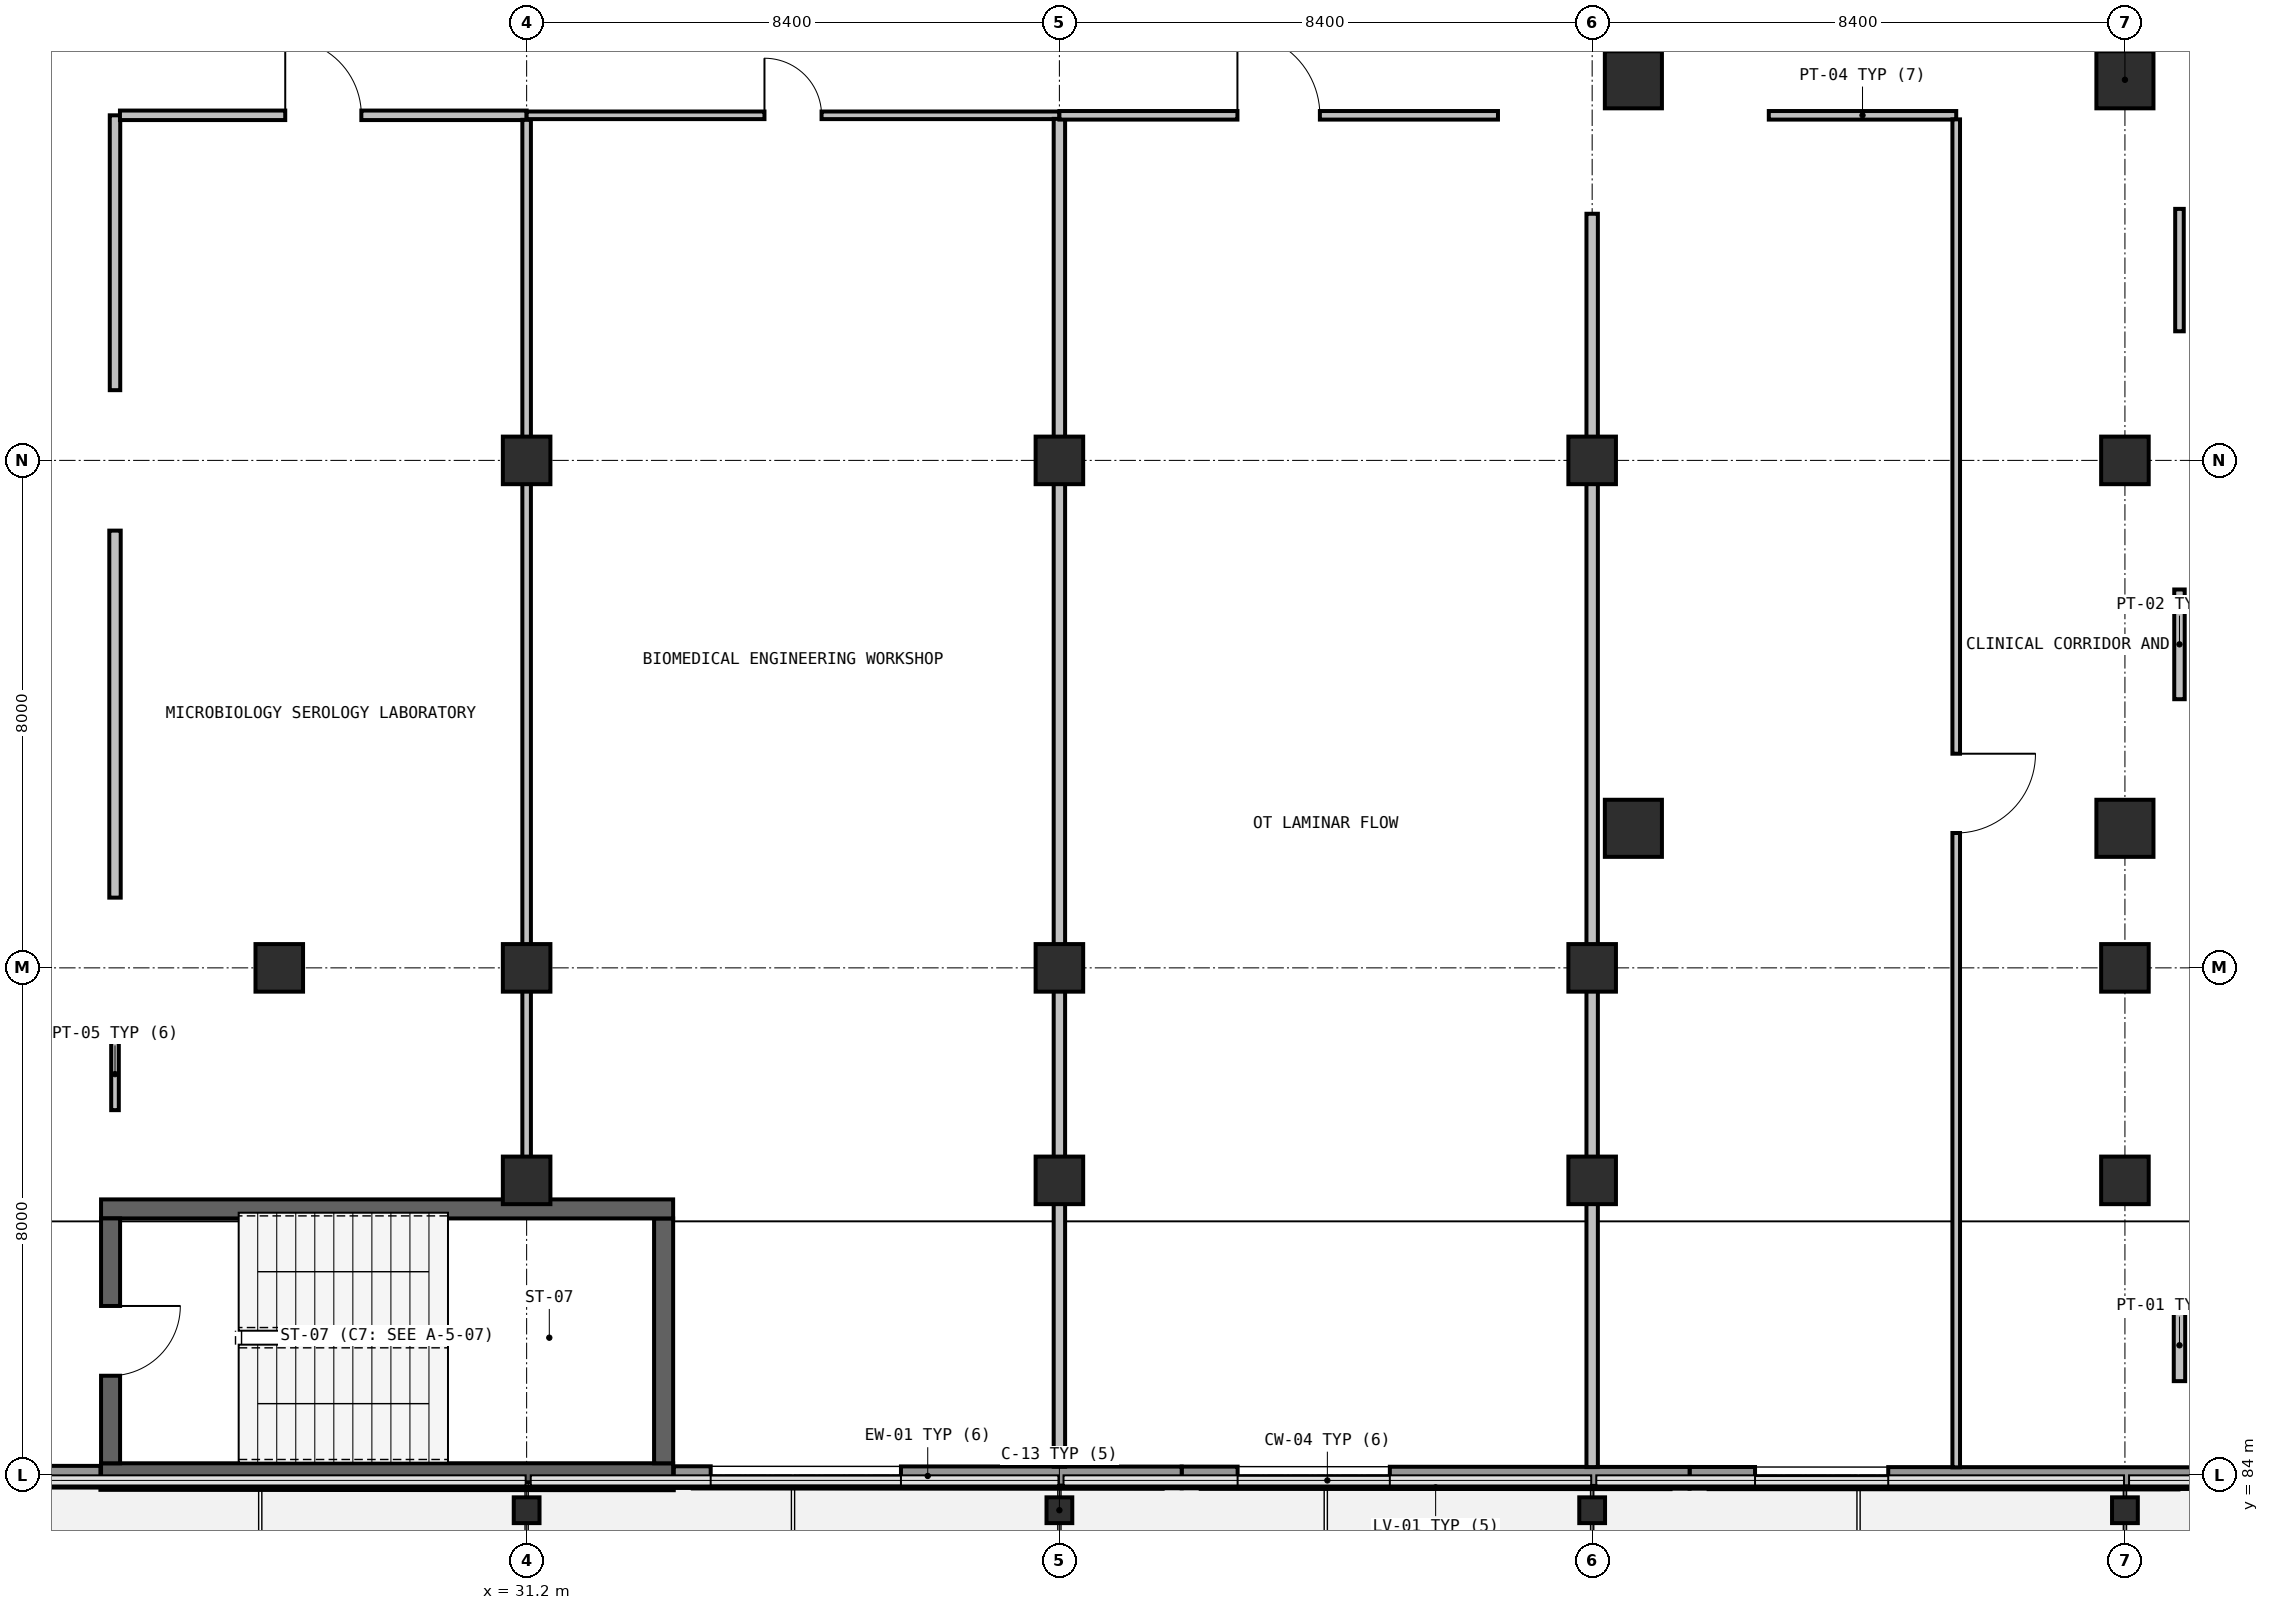
"""IFC4 building model, lengths in metres.
Left out: names, types, materials, properties, quantities, classifications, styles, units other than length and angle.
Written with IfcOpenShell. Run it as: python <this file> out.ifc"""

import sys

from ifc_helpers import new_model, si_unit, direction, frame, frame_2d, origin, origin_2d, place, context, subcontext, project, spatial, rectangle, hollow_circle, extrude, element, fill, save


model = new_model("IFC4")
c1 = context("Model", 3, precision=1e-05, world=origin(), true_north=direction((0.0, 1.0)))
c2 = subcontext(c1, "Body", "Model", "MODEL_VIEW")
j1 = project(units=[si_unit("LENGTHUNIT", "METRE"), si_unit("PLANEANGLEUNIT", "RADIAN")], contexts=[c1])
p1 = place(None, origin())
s1 = spatial("IfcSite", under=j1, at=p1, CompositionType="ELEMENT")
p2 = place(p1, origin())
s2 = spatial("IfcBuilding", under=s1, at=p2, CompositionType="ELEMENT")
p3 = place(p2, frame((0.0, 0.0, 15.0)))
s3 = spatial("IfcBuildingStorey", under=s2, at=p3, CompositionType="ELEMENT", Elevation=15.0)
for number, where, z_axis, x_axis in (
    (1, (31.2, 83.45, 0.0), (0.0, 0.0, 1.0), (1.0, 0.0, 0.0)),
    (2, (39.6, 83.45, 0.0), (0.0, 0.0, 1.0), (1.0, 0.0, 0.0)),
    (3, (48.0, 83.45, 0.0), (0.0, 0.0, 1.0), (1.0, 0.0, 0.0)),
    (4, (56.4, 83.45, 0.0), (0.0, 0.0, 1.0), (1.0, 0.0, 0.0)),
):
    element("IfcColumn", number, at=place(p3, frame(where, z_axis=z_axis, x_axis=x_axis)), inside=s3, PredefinedType="COLUMN", context=c2, shape_type="SweptSolid", body=[
        extrude(hollow_circle(Radius=0.203, WallThickness=0.016, at=origin_2d()), origin(), (0.0, 0.0, 1.0), 3.155),
    ])
for number, where, z_axis, x_axis in (
    (5, (48.65, 94.2, 0.0), (0.0, 0.0, 1.0), (1.0, 0.0, 0.0)),
    (6, (56.4, 94.2, 0.0), (0.0, 0.0, 1.0), (1.0, 0.0, 0.0)),
    (7, (48.65, 106.0, 0.0), (0.0, 0.0, 1.0), (1.0, 0.0, 0.0)),
    (8, (56.4, 106.0, 0.0), (0.0, 0.0, 1.0), (1.0, 0.0, 0.0)),
):
    element("IfcColumn", number, at=place(p3, frame(where, z_axis=z_axis, x_axis=x_axis)), inside=s3, PredefinedType="COLUMN", context=c2, shape_type="SweptSolid", body=[
        extrude(rectangle(XDim=0.9, YDim=0.9, at=origin_2d()), origin(), (0.0, 0.0, 1.0), 4.2),
    ])
for number, where, z_axis, x_axis in (
    (9, (27.3, 92.0, 0.0), (0.0, 0.0, 1.0), (1.0, 0.0, 0.0)),
    (10, (31.2, 88.65, 0.0), (0.0, 0.0, 1.0), (1.0, 0.0, 0.0)),
    (11, (31.2, 92.0, 0.0), (0.0, 0.0, 1.0), (1.0, 0.0, 0.0)),
    (12, (31.2, 100.0, 0.0), (0.0, 0.0, 1.0), (1.0, 0.0, 0.0)),
    (13, (39.6, 88.65, 0.0), (0.0, 0.0, 1.0), (1.0, 0.0, 0.0)),
    (14, (39.6, 92.0, 0.0), (0.0, 0.0, 1.0), (1.0, 0.0, 0.0)),
    (15, (39.6, 100.0, 0.0), (0.0, 0.0, 1.0), (1.0, 0.0, 0.0)),
    (16, (48.0, 88.65, 0.0), (0.0, 0.0, 1.0), (1.0, 0.0, 0.0)),
    (17, (48.0, 92.0, 0.0), (0.0, 0.0, 1.0), (1.0, 0.0, 0.0)),
    (18, (48.0, 100.0, 0.0), (0.0, 0.0, 1.0), (1.0, 0.0, 0.0)),
    (19, (56.4, 88.65, 0.0), (0.0, 0.0, 1.0), (1.0, 0.0, 0.0)),
    (20, (56.4, 92.0, 0.0), (0.0, 0.0, 1.0), (1.0, 0.0, 0.0)),
    (21, (56.4, 100.0, 0.0), (0.0, 0.0, 1.0), (1.0, 0.0, 0.0)),
):
    element("IfcColumn", number, at=place(p3, frame(where, z_axis=z_axis, x_axis=x_axis)), inside=s3, PredefinedType="COLUMN", context=c2, shape_type="SweptSolid", body=[
        extrude(rectangle(XDim=0.75, YDim=0.75, at=origin_2d()), origin(), (0.0, 0.0, 1.0), 4.2),
    ])
p4 = place(p3, frame((57.544, 83.977, 0.0), z_axis=(0.0, 0.0, 1.0), x_axis=(-0.99999981411, 0.000609737395, 0.0)))
e22 = element("IfcWall", 22, at=p4, inside=s3, PredefinedType="SOLIDWALL", context=c2, shape_type="SweptSolid", body=[
    extrude(rectangle(XDim=8.008, YDim=0.3, at=frame_2d((4.004, 0.0))), origin(), (0.0, 0.0, 1.0), 3.895),
])
p5 = place(p4, frame((4.876, 0.0, 0.96)))
e23 = element("IfcOpeningElement", 23, at=p5, cuts=e22, PredefinedType="OPENING", context=c2, shape_type="SweptSolid", body=[
    extrude(rectangle(XDim=2.1, YDim=1.65, at=frame_2d((1.05, 0.825))), frame((0.0, 0.16, 0.0), z_axis=(0.0, -1.0, 0.0), x_axis=(1.0, 0.0, 0.0)), (0.0, 0.0, 1.0), 0.32),
])
p6 = place(p3, frame((49.536, 83.982, 0.0), z_axis=(0.0, 0.0, 1.0), x_axis=(-0.999999709529, 0.000762194901, 0.0)))
e24 = element("IfcWall", 24, at=p6, inside=s3, PredefinedType="SOLIDWALL", context=c2, shape_type="SweptSolid", body=[
    extrude(rectangle(XDim=8.008, YDim=0.3, at=frame_2d((4.004, 0.0))), origin(), (0.0, 0.0, 1.0), 3.895),
])
p7 = place(p6, frame((4.726, 0.0, 0.96)))
e25 = element("IfcOpeningElement", 25, at=p7, cuts=e24, PredefinedType="OPENING", context=c2, shape_type="SweptSolid", body=[
    extrude(rectangle(XDim=2.4, YDim=1.65, at=frame_2d((1.2, 0.825))), frame((0.0, 0.16, 0.0), z_axis=(0.0, -1.0, 0.0), x_axis=(1.0, 0.0, 0.0)), (0.0, 0.0, 1.0), 0.32),
])
p8 = place(p3, frame((41.528, 83.988, 0.0), z_axis=(0.0, 0.0, 1.0), x_axis=(-0.99999981411, 0.000609737395, 0.0)))
e26 = element("IfcWall", 26, at=p8, inside=s3, PredefinedType="SOLIDWALL", context=c2, shape_type="SweptSolid", body=[
    extrude(rectangle(XDim=8.008, YDim=0.3, at=frame_2d((4.004, 0.0))), origin(), (0.0, 0.0, 1.0), 3.895),
])
p9 = place(p8, frame((4.426, 0.0, 0.96)))
e27 = element("IfcOpeningElement", 27, at=p9, cuts=e26, PredefinedType="OPENING", context=c2, shape_type="SweptSolid", body=[
    extrude(rectangle(XDim=3.0, YDim=1.65, at=frame_2d((1.5, 0.825))), frame((0.0, 0.16, 0.0), z_axis=(0.0, -1.0, 0.0), x_axis=(1.0, 0.0, 0.0)), (0.0, 0.0, 1.0), 0.32),
])
p10 = place(p3, frame((24.48, 83.999, 0.0), z_axis=(0.0, 0.0, 1.0), x_axis=(-0.999999830842, 0.000581648876, 0.0)))
e28 = element("IfcWall", 28, at=p10, inside=s3, PredefinedType="SOLIDWALL", context=c2, shape_type="SweptSolid", body=[
    extrude(rectangle(XDim=1.679, YDim=0.3, at=frame_2d((0.839, 0.0))), origin(), (0.0, 0.0, 1.0), 3.895),
])
p11 = place(p3, frame((24.49, 84.04, 0.0), z_axis=(0.0, 0.0, 1.0), x_axis=(1.0, 0.0, 0.0)))
e29 = element("IfcWall", 29, at=p11, inside=s3, PredefinedType="SHEAR", context=c2, shape_type="SweptSolid", body=[
    extrude(rectangle(XDim=9.02, YDim=0.3, at=frame_2d((4.51, 0.0))), origin(), (0.0, 0.0, 1.0), 3.895),
])
p12 = place(p3, frame((33.36, 84.19, 0.0), z_axis=(0.0, 0.0, 1.0), x_axis=(0.0, 1.0, 0.0)))
e30 = element("IfcWall", 30, at=p12, inside=s3, PredefinedType="SHEAR", context=c2, shape_type="SweptSolid", body=[
    extrude(rectangle(XDim=3.86, YDim=0.3, at=frame_2d((1.93, 0.0))), origin(), (0.0, 0.0, 1.0), 3.895),
])
p13 = place(p3, frame((33.51, 88.2, 0.0), z_axis=(0.0, 0.0, 1.0), x_axis=(-1.0, 0.0, 0.0)))
e31 = element("IfcWall", 31, at=p13, inside=s3, PredefinedType="SHEAR", context=c2, shape_type="SweptSolid", body=[
    extrude(rectangle(XDim=9.02, YDim=0.3, at=frame_2d((4.51, 0.0))), origin(), (0.0, 0.0, 1.0), 3.895),
])
p14 = place(p3, frame((24.64, 88.05, 0.0), z_axis=(0.0, 0.0, 1.0), x_axis=(0.0, -1.0, 0.0)))
e32 = element("IfcWall", 32, at=p14, inside=s3, PredefinedType="SHEAR", context=c2, shape_type="SweptSolid", body=[
    extrude(rectangle(XDim=3.86, YDim=0.3, at=frame_2d((1.93, 0.0))), origin(), (0.0, 0.0, 1.0), 3.895),
])
p15 = place(p14, frame((1.38, 0.0, 0.0)))
e33 = element("IfcOpeningElement", 33, at=p15, cuts=e32, PredefinedType="OPENING", context=c2, shape_type="SweptSolid", body=[
    extrude(rectangle(XDim=1.1, YDim=2.15, at=frame_2d((0.55, 1.075))), frame((0.0, 0.16, 0.0), z_axis=(0.0, -1.0, 0.0), x_axis=(1.0, 0.0, 0.0)), (0.0, 0.0, 1.0), 0.32),
])
p16 = place(p3, frame((24.71, 89.757, 0.0), z_axis=(0.0, 0.0, 1.0), x_axis=(0.0, 1.0, 0.0)))
e34 = element("IfcWall", 34, at=p16, inside=s3, PredefinedType="PARTITIONING", context=c2, shape_type="SweptSolid", body=[
    extrude(rectangle(XDim=1.136, YDim=0.12, at=frame_2d((0.568, 0.0))), origin(), (0.0, 0.0, 1.0), 3.895),
])
p17 = place(p3, frame((24.71, 93.107, 0.0), z_axis=(0.0, 0.0, 1.0), x_axis=(0.0, 1.0, 0.0)))
e35 = element("IfcWall", 35, at=p17, inside=s3, PredefinedType="PARTITIONING", context=c2, shape_type="SweptSolid", body=[
    extrude(rectangle(XDim=5.786, YDim=0.18, at=frame_2d((2.893, 0.0))), origin(), (0.0, 0.0, 1.0), 3.895),
])
p18 = place(p3, frame((24.71, 101.107, 0.0), z_axis=(0.0, 0.0, 1.0), x_axis=(0.0, 1.0, 0.0)))
e36 = element("IfcWall", 36, at=p18, inside=s3, PredefinedType="PARTITIONING", context=c2, shape_type="SweptSolid", body=[
    extrude(rectangle(XDim=4.333, YDim=0.165, at=frame_2d((2.167, 0.0))), origin(), (0.0, 0.0, 1.0), 3.895),
])
p19 = place(p3, frame((24.788, 105.44, 0.0), z_axis=(0.0, 0.0, 1.0), x_axis=(1.0, 0.0, 0.0)))
e37 = element("IfcWall", 37, at=p19, inside=s3, PredefinedType="PARTITIONING", context=c2, shape_type="SweptSolid", body=[
    extrude(rectangle(XDim=6.412, YDim=0.15, at=frame_2d((3.206, 0.0))), origin(), (0.0, 0.0, 1.0), 3.895),
])
p20 = place(p19, frame((2.606, 0.0, 0.0)))
e38 = element("IfcOpeningElement", 38, at=p20, cuts=e37, PredefinedType="OPENING", context=c2, shape_type="SweptSolid", body=[
    extrude(rectangle(XDim=1.2, YDim=2.15, at=frame_2d((0.6, 1.075))), frame((0.0, 0.085, 0.0), z_axis=(0.0, -1.0, 0.0), x_axis=(1.0, 0.0, 0.0)), (0.0, 0.0, 1.0), 0.17),
])
p21 = place(p3, frame((31.2, 105.369, 0.0), z_axis=(0.0, 0.0, 1.0), x_axis=(0.0, -1.0, 0.0)))
e39 = element("IfcWall", 39, at=p21, inside=s3, PredefinedType="PARTITIONING", context=c2, shape_type="SweptSolid", body=[
    extrude(rectangle(XDim=17.022, YDim=0.135, at=frame_2d((8.511, 0.0))), origin(), (0.0, 0.0, 1.0), 3.245),
])
p22 = place(p3, frame((31.2, 105.44, 0.0), z_axis=(0.0, 0.0, 1.0), x_axis=(1.0, 0.0, 0.0)))
e40 = element("IfcWall", 40, at=p22, inside=s3, PredefinedType="PARTITIONING", context=c2, shape_type="SweptSolid", body=[
    extrude(rectangle(XDim=8.4, YDim=0.12, at=frame_2d((4.2, 0.0))), origin(), (0.0, 0.0, 1.0), 3.895),
])
p23 = place(p22, frame((3.75, 0.0, 0.0)))
e41 = element("IfcOpeningElement", 41, at=p23, cuts=e40, PredefinedType="OPENING", context=c2, shape_type="SweptSolid", body=[
    extrude(rectangle(XDim=0.9, YDim=2.1, at=frame_2d((0.45, 1.05))), frame((0.0, 0.07, 0.0), z_axis=(0.0, -1.0, 0.0), x_axis=(1.0, 0.0, 0.0)), (0.0, 0.0, 1.0), 0.14),
])
p24 = place(p3, frame((39.6, 105.384, 0.0), z_axis=(0.0, 0.0, 1.0), x_axis=(0.0, -1.0, 0.0)))
e42 = element("IfcWall", 42, at=p24, inside=s3, PredefinedType="PARTITIONING", context=c2, shape_type="SweptSolid", body=[
    extrude(rectangle(XDim=21.248, YDim=0.18, at=frame_2d((10.624, 0.0))), origin(), (0.0, 0.0, 1.0), 3.245),
])
p25 = place(p3, frame((39.6, 105.44, 0.0), z_axis=(0.0, 0.0, 1.0), x_axis=(1.0, 0.0, 0.0)))
e43 = element("IfcWall", 43, at=p25, inside=s3, PredefinedType="PARTITIONING", context=c2, shape_type="SweptSolid", body=[
    extrude(rectangle(XDim=6.915, YDim=0.135, at=frame_2d((3.458, 0.0))), origin(), (0.0, 0.0, 1.0), 3.895),
])
p26 = place(p25, frame((2.807, 0.0, 0.0)))
e44 = element("IfcOpeningElement", 44, at=p26, cuts=e43, PredefinedType="OPENING", context=c2, shape_type="SweptSolid", body=[
    extrude(rectangle(XDim=1.3, YDim=2.15, at=frame_2d((0.65, 1.075))), frame((0.0, 0.077, 0.0), z_axis=(0.0, -1.0, 0.0), x_axis=(1.0, 0.0, 0.0)), (0.0, 0.0, 1.0), 0.155),
])
p27 = place(p3, frame((48.0, 103.888, 0.0), z_axis=(0.0, 0.0, 1.0), x_axis=(0.0, -1.0, 0.0)))
e45 = element("IfcWall", 45, at=p27, inside=s3, PredefinedType="PARTITIONING", context=c2, shape_type="SweptSolid", body=[
    extrude(rectangle(XDim=19.758, YDim=0.18, at=frame_2d((9.879, 0.0))), origin(), (0.0, 0.0, 1.0), 3.245),
])
p28 = place(p3, frame((50.785, 105.44, 0.0), z_axis=(0.0, 0.0, 1.0), x_axis=(1.0, 0.0, 0.0)))
e46 = element("IfcWall", 46, at=p28, inside=s3, PredefinedType="PARTITIONING", context=c2, shape_type="SweptSolid", body=[
    extrude(rectangle(XDim=2.955, YDim=0.135, at=frame_2d((1.478, 0.0))), origin(), (0.0, 0.0, 1.0), 3.895),
])
p29 = place(p3, frame((53.74, 105.376, 0.0), z_axis=(0.0, 0.0, 1.0), x_axis=(0.0, -1.0, 0.0)))
e47 = element("IfcWall", 47, at=p29, inside=s3, PredefinedType="PARTITIONING", context=c2, shape_type="SweptSolid", body=[
    extrude(rectangle(XDim=21.25, YDim=0.12, at=frame_2d((10.625, 0.0))), origin(), (0.0, 0.0, 1.0), 3.895),
])
p30 = place(p29, frame((10.0, 0.0, 0.0)))
e48 = element("IfcOpeningElement", 48, at=p30, cuts=e47, PredefinedType="OPENING", context=c2, shape_type="SweptSolid", body=[
    extrude(rectangle(XDim=1.25, YDim=2.15, at=frame_2d((0.625, 1.075))), frame((0.0, 0.07, 0.0), z_axis=(0.0, -1.0, 0.0), x_axis=(1.0, 0.0, 0.0)), (0.0, 0.0, 1.0), 0.14),
])
p31 = place(p3, frame((57.26, 85.485, 0.0), z_axis=(0.0, 0.0, 1.0), x_axis=(0.0, 1.0, 0.0)))
e49 = element("IfcWall", 49, at=p31, inside=s3, PredefinedType="PARTITIONING", context=c2, shape_type="SweptSolid", body=[
    extrude(rectangle(XDim=1.13, YDim=0.18, at=frame_2d((0.565, 0.0))), origin(), (0.0, 0.0, 1.0), 3.895),
])
p32 = place(p3, frame((57.26, 96.235, 0.0), z_axis=(0.0, 0.0, 1.0), x_axis=(0.0, 1.0, 0.0)))
e50 = element("IfcWall", 50, at=p32, inside=s3, PredefinedType="PARTITIONING", context=c2, shape_type="SweptSolid", body=[
    extrude(rectangle(XDim=1.73, YDim=0.165, at=frame_2d((0.865, 0.0))), origin(), (0.0, 0.0, 1.0), 3.895),
])
p33 = place(p3, frame((57.26, 102.035, 0.0), z_axis=(0.0, 0.0, 1.0), x_axis=(0.0, 1.0, 0.0)))
e51 = element("IfcWall", 51, at=p33, inside=s3, PredefinedType="PARTITIONING", context=c2, shape_type="SweptSolid", body=[
    extrude(rectangle(XDim=1.93, YDim=0.135, at=frame_2d((0.965, 0.0))), origin(), (0.0, 0.0, 1.0), 3.895),
])
p34 = place(p5, origin())
e52 = element("IfcWindow", 52, at=p34, inside=s3, PartitioningType="SINGLE_PANEL", PredefinedType="WINDOW", context=c2, shape_type="SweptSolid", body=[
    extrude(rectangle(XDim=2.1, YDim=1.65, at=frame_2d((1.05, 0.825))), frame((0.0, 0.03, 0.0), z_axis=(0.0, -1.0, 0.0), x_axis=(1.0, 0.0, 0.0)), (0.0, 0.0, 1.0), 0.06),
])
fill(e23, e52)
p35 = place(p7, origin())
e53 = element("IfcWindow", 53, at=p35, inside=s3, PartitioningType="SINGLE_PANEL", PredefinedType="WINDOW", context=c2, shape_type="SweptSolid", body=[
    extrude(rectangle(XDim=2.4, YDim=1.65, at=frame_2d((1.2, 0.825))), frame((0.0, 0.03, 0.0), z_axis=(0.0, -1.0, 0.0), x_axis=(1.0, 0.0, 0.0)), (0.0, 0.0, 1.0), 0.06),
])
fill(e25, e53)
p36 = place(p9, origin())
e54 = element("IfcWindow", 54, at=p36, inside=s3, PartitioningType="SINGLE_PANEL", PredefinedType="WINDOW", context=c2, shape_type="SweptSolid", body=[
    extrude(rectangle(XDim=3.0, YDim=1.65, at=frame_2d((1.5, 0.825))), frame((0.0, 0.03, 0.0), z_axis=(0.0, -1.0, 0.0), x_axis=(1.0, 0.0, 0.0)), (0.0, 0.0, 1.0), 0.06),
])
fill(e27, e54)
p37 = place(p15, origin())
e55 = element("IfcDoor", 55, at=p37, inside=s3, OperationType="SINGLE_SWING_RIGHT", PredefinedType="DOOR", context=c2, shape_type="SweptSolid", body=[
    extrude(rectangle(XDim=1.1, YDim=2.15, at=frame_2d((0.55, 1.075))), frame((0.0, 0.025, 0.0), z_axis=(0.0, -1.0, 0.0), x_axis=(1.0, 0.0, 0.0)), (0.0, 0.0, 1.0), 0.05),
])
fill(e33, e55)
p38 = place(p20, origin())
e56 = element("IfcDoor", 56, at=p38, inside=s3, OperationType="SINGLE_SWING_LEFT", PredefinedType="DOOR", context=c2, shape_type="SweptSolid", body=[
    extrude(rectangle(XDim=1.2, YDim=2.15, at=frame_2d((0.6, 1.075))), frame((0.0, 0.025, 0.0), z_axis=(0.0, -1.0, 0.0), x_axis=(1.0, 0.0, 0.0)), (0.0, 0.0, 1.0), 0.05),
])
fill(e38, e56)
p39 = place(p23, origin())
e57 = element("IfcDoor", 57, at=p39, inside=s3, OperationType="SINGLE_SWING_LEFT", PredefinedType="DOOR", context=c2, shape_type="SweptSolid", body=[
    extrude(rectangle(XDim=0.9, YDim=2.1, at=frame_2d((0.45, 1.05))), frame((0.0, 0.025, 0.0), z_axis=(0.0, -1.0, 0.0), x_axis=(1.0, 0.0, 0.0)), (0.0, 0.0, 1.0), 0.05),
])
fill(e41, e57)
p40 = place(p26, origin())
e58 = element("IfcDoor", 58, at=p40, inside=s3, OperationType="SINGLE_SWING_RIGHT", PredefinedType="DOOR", context=c2, shape_type="SweptSolid", body=[
    extrude(rectangle(XDim=1.3, YDim=2.15, at=frame_2d((0.65, 1.075))), frame((0.0, 0.025, 0.0), z_axis=(0.0, -1.0, 0.0), x_axis=(1.0, 0.0, 0.0)), (0.0, 0.0, 1.0), 0.05),
])
fill(e44, e58)
p41 = place(p30, origin())
e59 = element("IfcDoor", 59, at=p41, inside=s3, OperationType="SINGLE_SWING_LEFT", PredefinedType="DOOR", context=c2, shape_type="SweptSolid", body=[
    extrude(rectangle(XDim=1.25, YDim=2.15, at=frame_2d((0.625, 1.075))), frame((0.0, 0.025, 0.0), z_axis=(0.0, -1.0, 0.0), x_axis=(1.0, 0.0, 0.0)), (0.0, 0.0, 1.0), 0.05),
])
fill(e48, e59)
save(model, sys.argv[1])
